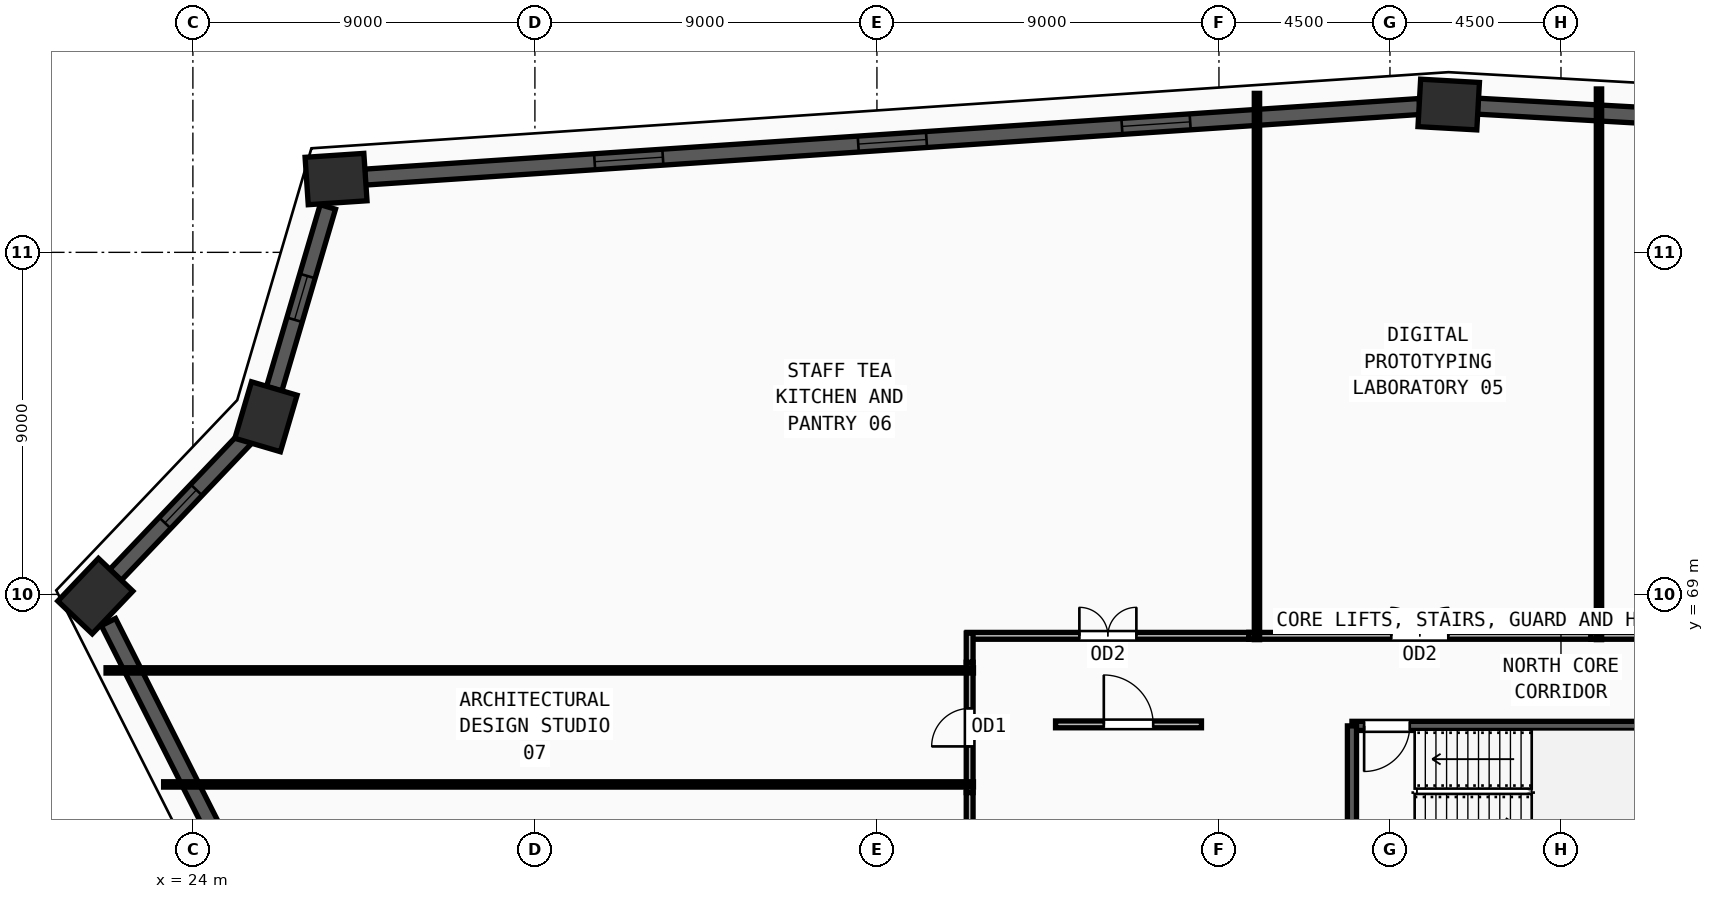
"""IFC4 building model, lengths in metres.
Left out: names, types, materials, properties, quantities, classifications, styles, units other than length and angle.
Written with IfcOpenShell. Run it as: python <this file> out.ifc"""

import sys

from ifc_helpers import new_model, si_unit, direction, frame, frame_2d, origin, origin_2d, place, context, subcontext, project, spatial, rectangle, extrude, source, transform, mapped, element, fill, save


model = new_model("IFC4")
c1 = context("Model", 3, precision=1e-05, world=origin(), true_north=direction((0.0, 1.0)))
c2 = subcontext(c1, "Body", "Model", "MODEL_VIEW")
j1 = project(units=[si_unit("LENGTHUNIT", "METRE"), si_unit("PLANEANGLEUNIT", "RADIAN")], contexts=[c1])
p1 = place(None, origin())
s1 = spatial("IfcSite", under=j1, at=p1, CompositionType="ELEMENT")
p2 = place(p1, origin())
s2 = spatial("IfcBuilding", under=s1, at=p2, CompositionType="ELEMENT")
p3 = place(p2, frame((0.0, 0.0, 51.75)))
s3 = spatial("IfcBuildingStorey", under=s2, at=p3, CompositionType="ELEMENT", Elevation=51.75)
m1 = source(origin(), c2, "Body", "SweptSolid", [
    extrude(rectangle(XDim=1.55, YDim=1.25, at=origin_2d()), origin(), (0.0, 0.0, 1.0), 3.75),
])
for number, where, z_axis, x_axis in (
    (1, (21.433, 68.955, 0.0), (0.0, 0.0, 1.0), (0.689, 0.724, 0.0)),
    (2, (25.923, 73.674, 0.0), (0.0, 0.0, 1.0), (0.283, 0.959, 0.0)),
    (3, (27.767, 79.929, 0.0), (0.0, 0.0, 1.0), (0.998, 0.067, 0.0)),
    (4, (57.046, 81.889, 0.0), (0.0, 0.0, 1.0), (-0.998, 0.056, 0.0)),
):
    element("IfcColumn", number, at=place(p3, frame(where, z_axis=z_axis, x_axis=x_axis)), inside=s3, PredefinedType="COLUMN", context=c2, shape_type="MappedRepresentation", body=[
        mapped(m1, transform((0.0, 0.0, 0.0), x_axis=(1.0, 0.0, 0.0), y_axis=(0.0, 1.0, 0.0), z_axis=(0.0, 0.0, 1.0), scale=1.0)),
    ])
p4 = place(p3, frame((91.471, 79.966, 0.0), z_axis=(0.0, 0.0, 1.0), x_axis=(-0.998444156387, 0.055760797854, 0.0)))
e5 = element("IfcWall", 5, at=p4, inside=s3, PredefinedType="SOLIDWALL", context=c2, shape_type="SweptSolid", body=[
    extrude(rectangle(XDim=33.713, YDim=0.42, at=frame_2d((16.857, 0.0))), origin(), (0.0, 0.0, 1.0), 3.57),
])
m2 = source(origin(), c2, "Body", "SweptSolid", [
    extrude(rectangle(XDim=1.8, YDim=1.95, at=frame_2d((0.9, 0.975))), frame((0.0, 0.22, 0.0), z_axis=(0.0, -1.0, 0.0), x_axis=(1.0, 0.0, 0.0)), (0.0, 0.0, 1.0), 0.44),
])
p5 = place(p4, frame((7.528, 0.0, 0.55)))
e6 = element("IfcOpeningElement", 6, at=p5, cuts=e5, PredefinedType="OPENING", context=c2, shape_type="MappedRepresentation", body=[
    mapped(m2, transform((0.0, 0.0, 0.0), x_axis=(1.0, 0.0, 0.0), y_axis=(0.0, 1.0, 0.0), z_axis=(0.0, 0.0, 1.0), scale=1.0)),
])
p6 = place(p4, frame((15.957, 0.0, 0.55)))
e7 = element("IfcOpeningElement", 7, at=p6, cuts=e5, PredefinedType="OPENING", context=c2, shape_type="MappedRepresentation", body=[
    mapped(m2, transform((0.0, 0.0, 0.0), x_axis=(1.0, 0.0, 0.0), y_axis=(0.0, 1.0, 0.0), z_axis=(0.0, 0.0, 1.0), scale=1.0)),
])
p7 = place(p4, frame((24.385, 0.0, 0.55)))
e8 = element("IfcOpeningElement", 8, at=p7, cuts=e5, PredefinedType="OPENING", context=c2, shape_type="MappedRepresentation", body=[
    mapped(m2, transform((0.0, 0.0, 0.0), x_axis=(1.0, 0.0, 0.0), y_axis=(0.0, 1.0, 0.0), z_axis=(0.0, 0.0, 1.0), scale=1.0)),
])
p8 = place(p3, frame((56.283, 81.838, 0.0), z_axis=(0.0, 0.0, 1.0), x_axis=(-0.99776671065, -0.066795142933, 0.0)))
e9 = element("IfcWall", 9, at=p8, inside=s3, PredefinedType="SOLIDWALL", context=c2, shape_type="SweptSolid", body=[
    extrude(rectangle(XDim=27.815, YDim=0.42, at=frame_2d((13.907, 0.0))), origin(), (0.0, 0.0, 1.0), 3.57),
])
p9 = place(p8, frame((6.054, 0.0, 0.55)))
e10 = element("IfcOpeningElement", 10, at=p9, cuts=e9, PredefinedType="OPENING", context=c2, shape_type="MappedRepresentation", body=[
    mapped(m2, transform((0.0, 0.0, 0.0), x_axis=(1.0, 0.0, 0.0), y_axis=(0.0, 1.0, 0.0), z_axis=(0.0, 0.0, 1.0), scale=1.0)),
])
p10 = place(p8, frame((13.008, 0.0, 0.55)))
e11 = element("IfcOpeningElement", 11, at=p10, cuts=e9, PredefinedType="OPENING", context=c2, shape_type="MappedRepresentation", body=[
    mapped(m2, transform((0.0, 0.0, 0.0), x_axis=(1.0, 0.0, 0.0), y_axis=(0.0, 1.0, 0.0), z_axis=(0.0, 0.0, 1.0), scale=1.0)),
])
p11 = place(p8, frame((19.961, 0.0, 0.55)))
e12 = element("IfcOpeningElement", 12, at=p11, cuts=e9, PredefinedType="OPENING", context=c2, shape_type="MappedRepresentation", body=[
    mapped(m2, transform((0.0, 0.0, 0.0), x_axis=(1.0, 0.0, 0.0), y_axis=(0.0, 1.0, 0.0), z_axis=(0.0, 0.0, 1.0), scale=1.0)),
])
p12 = place(p3, frame((27.551, 79.195, 0.0), z_axis=(0.0, 0.0, 1.0), x_axis=(-0.282928947313, -0.959140871182, 0.0)))
e13 = element("IfcWall", 13, at=p12, inside=s3, PredefinedType="SOLIDWALL", context=c2, shape_type="SweptSolid", body=[
    extrude(rectangle(XDim=4.991, YDim=0.42, at=frame_2d((2.496, 0.0))), origin(), (0.0, 0.0, 1.0), 3.57),
])
m3 = source(origin(), c2, "Body", "SweptSolid", [
    extrude(rectangle(XDim=1.2, YDim=1.9, at=frame_2d((0.6, 0.95))), frame((0.0, 0.22, 0.0), z_axis=(0.0, -1.0, 0.0), x_axis=(1.0, 0.0, 0.0)), (0.0, 0.0, 1.0), 0.44),
])
p13 = place(p12, frame((1.895, 0.0, 0.55)))
e14 = element("IfcOpeningElement", 14, at=p13, cuts=e13, PredefinedType="OPENING", context=c2, shape_type="MappedRepresentation", body=[
    mapped(m3, transform((0.0, 0.0, 0.0), x_axis=(1.0, 0.0, 0.0), y_axis=(0.0, 1.0, 0.0), z_axis=(0.0, 0.0, 1.0), scale=1.0)),
])
p14 = place(p3, frame((25.396, 73.12, 0.0), z_axis=(0.0, 0.0, 1.0), x_axis=(-0.689329780071, -0.724447689145, 0.0)))
e15 = element("IfcWall", 15, at=p14, inside=s3, PredefinedType="SOLIDWALL", context=c2, shape_type="SweptSolid", body=[
    extrude(rectangle(XDim=4.985, YDim=0.42, at=frame_2d((2.492, 0.0))), origin(), (0.0, 0.0, 1.0), 3.57),
])
p15 = place(p14, frame((1.892, 0.0, 0.55)))
e16 = element("IfcOpeningElement", 16, at=p15, cuts=e15, PredefinedType="OPENING", context=c2, shape_type="MappedRepresentation", body=[
    mapped(m3, transform((0.0, 0.0, 0.0), x_axis=(1.0, 0.0, 0.0), y_axis=(0.0, 1.0, 0.0), z_axis=(0.0, 0.0, 1.0), scale=1.0)),
])
p16 = place(p3, frame((21.778, 68.272, 0.0), z_axis=(0.0, 0.0, 1.0), x_axis=(0.45088567069, -0.892581711647, 0.0)))
e17 = element("IfcWall", 17, at=p16, inside=s3, PredefinedType="SOLIDWALL", context=c2, shape_type="SweptSolid", body=[
    extrude(rectangle(XDim=33.713, YDim=0.42, at=frame_2d((16.857, 0.0))), origin(), (0.0, 0.0, 1.0), 3.57),
])
p17 = place(p16, frame((7.528, 0.0, 0.55)))
e18 = element("IfcOpeningElement", 18, at=p17, cuts=e17, PredefinedType="OPENING", context=c2, shape_type="MappedRepresentation", body=[
    mapped(m2, transform((0.0, 0.0, 0.0), x_axis=(1.0, 0.0, 0.0), y_axis=(0.0, 1.0, 0.0), z_axis=(0.0, 0.0, 1.0), scale=1.0)),
])
p18 = place(p16, frame((15.957, 0.0, 0.55)))
e19 = element("IfcOpeningElement", 19, at=p18, cuts=e17, PredefinedType="OPENING", context=c2, shape_type="MappedRepresentation", body=[
    mapped(m2, transform((0.0, 0.0, 0.0), x_axis=(1.0, 0.0, 0.0), y_axis=(0.0, 1.0, 0.0), z_axis=(0.0, 0.0, 1.0), scale=1.0)),
])
p19 = place(p16, frame((23.535, 0.0, 0.55)))
e20 = element("IfcOpeningElement", 20, at=p19, cuts=e17, PredefinedType="OPENING", context=c2, shape_type="MappedRepresentation", body=[
    mapped(m2, transform((0.0, 0.0, 0.0), x_axis=(1.0, 0.0, 0.0), y_axis=(0.0, 1.0, 0.0), z_axis=(0.0, 0.0, 1.0), scale=1.0)),
])
p20 = place(p3, frame((62.32, 65.54, 0.0), z_axis=(0.0, 0.0, 1.0), x_axis=(-1.0, 0.0, 0.0)))
e21 = element("IfcWall", 21, at=p20, inside=s3, PredefinedType="SOLIDWALL", context=c2, shape_type="SweptSolid", body=[
    extrude(rectangle(XDim=7.82, YDim=0.24, at=frame_2d((3.91, 0.0))), origin(), (0.0, 0.0, 1.0), 3.57),
])
m4 = source(origin(), c2, "Body", "SweptSolid", [
    extrude(rectangle(XDim=1.2, YDim=2.2, at=frame_2d((0.6, 1.1))), frame((0.0, 0.13, 0.0), z_axis=(0.0, -1.0, 0.0), x_axis=(1.0, 0.0, 0.0)), (0.0, 0.0, 1.0), 0.26),
])
p21 = place(p20, frame((6.3, 0.0, 0.0)))
e22 = element("IfcOpeningElement", 22, at=p21, cuts=e21, PredefinedType="OPENING", context=c2, shape_type="MappedRepresentation", body=[
    mapped(m4, transform((0.0, 0.0, 0.0), x_axis=(1.0, 0.0, 0.0), y_axis=(0.0, 1.0, 0.0), z_axis=(0.0, 0.0, 1.0), scale=1.0)),
])
p22 = place(p3, frame((54.5, 65.54, 0.0), z_axis=(0.0, 0.0, 1.0), x_axis=(0.0, -1.0, 0.0)))
e23 = element("IfcWall", 23, at=p22, inside=s3, PredefinedType="SOLIDWALL", context=c2, shape_type="SweptSolid", body=[
    extrude(rectangle(XDim=3.44, YDim=0.24, at=frame_2d((1.72, 0.0))), origin(), (0.0, 0.0, 1.0), 3.57),
])
p23 = place(p3, frame((46.7, 65.58, 0.0), z_axis=(0.0, 0.0, 1.0), x_axis=(1.0, 0.0, 0.0)))
e24 = element("IfcWall", 24, at=p23, inside=s3, PredefinedType="PARTITIONING", context=c2, shape_type="SweptSolid", body=[
    extrude(rectangle(XDim=3.84, YDim=0.18, at=frame_2d((1.92, 0.0))), origin(), (0.0, 0.0, 1.0), 3.57),
])
m5 = source(origin(), c2, "Body", "SweptSolid", [
    extrude(rectangle(XDim=1.3, YDim=2.2, at=frame_2d((0.65, 1.1))), frame((0.0, 0.1, 0.0), z_axis=(0.0, -1.0, 0.0), x_axis=(1.0, 0.0, 0.0)), (0.0, 0.0, 1.0), 0.2),
])
p24 = place(p23, frame((1.27, 0.0, 0.0)))
e25 = element("IfcOpeningElement", 25, at=p24, cuts=e24, PredefinedType="OPENING", context=c2, shape_type="MappedRepresentation", body=[
    mapped(m5, transform((0.0, 0.0, 0.0), x_axis=(1.0, 0.0, 0.0), y_axis=(0.0, 1.0, 0.0), z_axis=(0.0, 0.0, 1.0), scale=1.0)),
])
p25 = place(p3, frame((60.785, 67.91, 0.0), z_axis=(0.0, 0.0, 1.0), x_axis=(1.0, 0.0, 0.0)))
e26 = element("IfcWall", 26, at=p25, inside=s3, PredefinedType="PARTITIONING", context=c2, shape_type="SweptSolid", body=[
    extrude(rectangle(XDim=8.0, YDim=0.18, at=frame_2d((4.0, 0.0))), origin(), (0.0, 0.0, 1.0), 3.57),
])
m6 = source(origin(), c2, "Body", "SweptSolid", [
    extrude(rectangle(XDim=1.0, YDim=2.2, at=frame_2d((0.5, 1.1))), frame((0.0, 0.1, 0.0), z_axis=(0.0, -1.0, 0.0), x_axis=(1.0, 0.0, 0.0)), (0.0, 0.0, 1.0), 0.2),
])
p26 = place(p25, frame((3.5, 0.0, 0.0)))
e27 = element("IfcOpeningElement", 27, at=p26, cuts=e26, PredefinedType="OPENING", context=c2, shape_type="MappedRepresentation", body=[
    mapped(m6, transform((0.0, 0.0, 0.0), x_axis=(1.0, 0.0, 0.0), y_axis=(0.0, 1.0, 0.0), z_axis=(0.0, 0.0, 1.0), scale=1.0)),
])
p27 = place(p3, frame((51.785, 67.91, 0.0), z_axis=(0.0, 0.0, 1.0), x_axis=(1.0, 0.0, 0.0)))
e28 = element("IfcWall", 28, at=p27, inside=s3, PredefinedType="PARTITIONING", context=c2, shape_type="SweptSolid", body=[
    extrude(rectangle(XDim=9.0, YDim=0.18, at=frame_2d((4.5, 0.0))), origin(), (0.0, 0.0, 1.0), 3.57),
])
m7 = source(origin(), c2, "Body", "SweptSolid", [
    extrude(rectangle(XDim=1.5, YDim=2.2, at=frame_2d((0.75, 1.1))), frame((0.0, 0.1, 0.0), z_axis=(0.0, -1.0, 0.0), x_axis=(1.0, 0.0, 0.0)), (0.0, 0.0, 1.0), 0.2),
])
p28 = place(p27, frame((3.75, 0.0, 0.0)))
e29 = element("IfcOpeningElement", 29, at=p28, cuts=e28, PredefinedType="OPENING", context=c2, shape_type="MappedRepresentation", body=[
    mapped(m7, transform((0.0, 0.0, 0.0), x_axis=(1.0, 0.0, 0.0), y_axis=(0.0, 1.0, 0.0), z_axis=(0.0, 0.0, 1.0), scale=1.0)),
])
p29 = place(p3, frame((44.37, 67.91, 0.0), z_axis=(0.0, 0.0, 1.0), x_axis=(1.0, 0.0, 0.0)))
e30 = element("IfcWall", 30, at=p29, inside=s3, PredefinedType="PARTITIONING", context=c2, shape_type="SweptSolid", body=[
    extrude(rectangle(XDim=7.415, YDim=0.18, at=frame_2d((3.708, 0.0))), origin(), (0.0, 0.0, 1.0), 3.57),
])
p30 = place(p29, frame((2.957, 0.0, 0.0)))
e31 = element("IfcOpeningElement", 31, at=p30, cuts=e30, PredefinedType="OPENING", context=c2, shape_type="MappedRepresentation", body=[
    mapped(m7, transform((0.0, 0.0, 0.0), x_axis=(1.0, 0.0, 0.0), y_axis=(0.0, 1.0, 0.0), z_axis=(0.0, 0.0, 1.0), scale=1.0)),
])
p31 = place(p3, frame((44.44, 63.785, 0.0), z_axis=(0.0, 0.0, 1.0), x_axis=(0.0, 1.0, 0.0)))
e32 = element("IfcWall", 32, at=p31, inside=s3, PredefinedType="PARTITIONING", context=c2, shape_type="SweptSolid", body=[
    extrude(rectangle(XDim=3.43, YDim=0.18, at=frame_2d((1.715, 0.0))), origin(), (0.0, 0.0, 1.0), 3.57),
])
p32 = place(p31, frame((1.215, 0.0, 0.0)))
e33 = element("IfcOpeningElement", 33, at=p32, cuts=e32, PredefinedType="OPENING", context=c2, shape_type="MappedRepresentation", body=[
    mapped(m6, transform((0.0, 0.0, 0.0), x_axis=(1.0, 0.0, 0.0), y_axis=(0.0, 1.0, 0.0), z_axis=(0.0, 0.0, 1.0), scale=1.0)),
])
p33 = place(p3, frame((44.44, 57.785, 0.0), z_axis=(0.0, 0.0, 1.0), x_axis=(0.0, 1.0, 0.0)))
e34 = element("IfcWall", 34, at=p33, inside=s3, PredefinedType="PARTITIONING", context=c2, shape_type="SweptSolid", body=[
    extrude(rectangle(XDim=6.0, YDim=0.18, at=frame_2d((3.0, 0.0))), origin(), (0.0, 0.0, 1.0), 3.57),
])
p34 = place(p33, frame((2.5, 0.0, 0.0)))
e35 = element("IfcOpeningElement", 35, at=p34, cuts=e34, PredefinedType="OPENING", context=c2, shape_type="MappedRepresentation", body=[
    mapped(m6, transform((0.0, 0.0, 0.0), x_axis=(1.0, 0.0, 0.0), y_axis=(0.0, 1.0, 0.0), z_axis=(0.0, 0.0, 1.0), scale=1.0)),
])
p35 = place(p3, frame((44.44, 67.215, 0.0), z_axis=(0.0, 0.0, 1.0), x_axis=(0.0, 1.0, 0.0)))
e36 = element("IfcWall", 36, at=p35, inside=s3, PredefinedType="PARTITIONING", context=c2, shape_type="SweptSolid", body=[
    extrude(rectangle(XDim=0.765, YDim=0.18, at=frame_2d((0.382, 0.0))), origin(), (0.0, 0.0, 1.0), 3.57),
])
p36 = place(p3, frame((44.54, 64.0, 0.0), z_axis=(0.0, 0.0, 1.0), x_axis=(-1.0, 0.0, 0.0)))
e37 = element("IfcWall", 37, at=p36, inside=s3, PredefinedType="PARTITIONING", context=c2, shape_type="SweptSolid", body=[
    extrude(rectangle(XDim=21.31, YDim=0.14, at=frame_2d((10.655, 0.0))), origin(), (0.0, 0.0, 1.0), 2.655),
])
p37 = place(p3, frame((44.54, 67.0, 0.0), z_axis=(0.0, 0.0, 1.0), x_axis=(-1.0, 0.0, 0.0)))
e38 = element("IfcWall", 38, at=p37, inside=s3, PredefinedType="PARTITIONING", context=c2, shape_type="SweptSolid", body=[
    extrude(rectangle(XDim=22.825, YDim=0.14, at=frame_2d((11.413, 0.0))), origin(), (0.0, 0.0, 1.0), 2.655),
])
p38 = place(p3, frame((52.0, 67.81, 0.0), z_axis=(0.0, 0.0, 1.0), x_axis=(0.0, 1.0, 0.0)))
e39 = element("IfcWall", 39, at=p38, inside=s3, PredefinedType="PARTITIONING", context=c2, shape_type="SweptSolid", body=[
    extrude(rectangle(XDim=14.373, YDim=0.14, at=frame_2d((7.187, 0.0))), origin(), (0.0, 0.0, 1.0), 3.57),
])
p39 = place(p3, frame((61.0, 67.81, 0.0), z_axis=(0.0, 0.0, 1.0), x_axis=(0.0, 1.0, 0.0)))
e40 = element("IfcWall", 40, at=p39, inside=s3, PredefinedType="PARTITIONING", context=c2, shape_type="SweptSolid", body=[
    extrude(rectangle(XDim=14.489, YDim=0.14, at=frame_2d((7.245, 0.0))), origin(), (0.0, 0.0, 1.0), 3.57),
])
m8 = source(origin(), c2, "Body", "SweptSolid", [
    extrude(rectangle(XDim=1.8, YDim=1.95, at=frame_2d((0.9, 0.975))), frame((0.0, 0.03, 0.0), z_axis=(0.0, -1.0, 0.0), x_axis=(1.0, 0.0, 0.0)), (0.0, 0.0, 1.0), 0.06),
])
p40 = place(p9, origin())
e41 = element("IfcWindow", 41, at=p40, inside=s3, PartitioningType="DOUBLE_PANEL_VERTICAL", PredefinedType="WINDOW", context=c2, shape_type="MappedRepresentation", body=[
    mapped(m8, transform((0.0, 0.0, 0.0), x_axis=(1.0, 0.0, 0.0), y_axis=(0.0, 1.0, 0.0), z_axis=(0.0, 0.0, 1.0), scale=1.0)),
])
fill(e10, e41)
p41 = place(p10, origin())
e42 = element("IfcWindow", 42, at=p41, inside=s3, PartitioningType="DOUBLE_PANEL_VERTICAL", PredefinedType="WINDOW", context=c2, shape_type="MappedRepresentation", body=[
    mapped(m8, transform((0.0, 0.0, 0.0), x_axis=(1.0, 0.0, 0.0), y_axis=(0.0, 1.0, 0.0), z_axis=(0.0, 0.0, 1.0), scale=1.0)),
])
fill(e11, e42)
p42 = place(p11, origin())
e43 = element("IfcWindow", 43, at=p42, inside=s3, PartitioningType="DOUBLE_PANEL_VERTICAL", PredefinedType="WINDOW", context=c2, shape_type="MappedRepresentation", body=[
    mapped(m8, transform((0.0, 0.0, 0.0), x_axis=(1.0, 0.0, 0.0), y_axis=(0.0, 1.0, 0.0), z_axis=(0.0, 0.0, 1.0), scale=1.0)),
])
fill(e12, e43)
m9 = source(origin(), c2, "Body", "SweptSolid", [
    extrude(rectangle(XDim=1.2, YDim=1.9, at=frame_2d((0.6, 0.95))), frame((0.0, 0.03, 0.0), z_axis=(0.0, -1.0, 0.0), x_axis=(1.0, 0.0, 0.0)), (0.0, 0.0, 1.0), 0.06),
])
p43 = place(p13, origin())
e44 = element("IfcWindow", 44, at=p43, inside=s3, PartitioningType="SINGLE_PANEL", PredefinedType="WINDOW", context=c2, shape_type="MappedRepresentation", body=[
    mapped(m9, transform((0.0, 0.0, 0.0), x_axis=(1.0, 0.0, 0.0), y_axis=(0.0, 1.0, 0.0), z_axis=(0.0, 0.0, 1.0), scale=1.0)),
])
fill(e14, e44)
p44 = place(p15, origin())
e45 = element("IfcWindow", 45, at=p44, inside=s3, PartitioningType="SINGLE_PANEL", PredefinedType="WINDOW", context=c2, shape_type="MappedRepresentation", body=[
    mapped(m9, transform((0.0, 0.0, 0.0), x_axis=(1.0, 0.0, 0.0), y_axis=(0.0, 1.0, 0.0), z_axis=(0.0, 0.0, 1.0), scale=1.0)),
])
fill(e16, e45)
m10 = source(origin(), c2, "Body", "SweptSolid", [
    extrude(rectangle(XDim=1.2, YDim=2.2, at=frame_2d((0.6, 1.1))), frame((0.0, 0.025, 0.0), z_axis=(0.0, -1.0, 0.0), x_axis=(1.0, 0.0, 0.0)), (0.0, 0.0, 1.0), 0.05),
])
p45 = place(p21, origin())
e46 = element("IfcDoor", 46, at=p45, inside=s3, OperationType="SINGLE_SWING_RIGHT", PredefinedType="DOOR", context=c2, shape_type="MappedRepresentation", body=[
    mapped(m10, transform((0.0, 0.0, 0.0), x_axis=(1.0, 0.0, 0.0), y_axis=(0.0, 1.0, 0.0), z_axis=(0.0, 0.0, 1.0), scale=1.0)),
])
fill(e22, e46)
m11 = source(origin(), c2, "Body", "SweptSolid", [
    extrude(rectangle(XDim=1.3, YDim=2.2, at=frame_2d((0.65, 1.1))), frame((0.0, 0.025, 0.0), z_axis=(0.0, -1.0, 0.0), x_axis=(1.0, 0.0, 0.0)), (0.0, 0.0, 1.0), 0.05),
])
p46 = place(p24, origin())
e47 = element("IfcDoor", 47, at=p46, inside=s3, OperationType="SINGLE_SWING_LEFT", PredefinedType="DOOR", context=c2, shape_type="MappedRepresentation", body=[
    mapped(m11, transform((0.0, 0.0, 0.0), x_axis=(1.0, 0.0, 0.0), y_axis=(0.0, 1.0, 0.0), z_axis=(0.0, 0.0, 1.0), scale=1.0)),
])
fill(e25, e47)
m12 = source(origin(), c2, "Body", "SweptSolid", [
    extrude(rectangle(XDim=1.5, YDim=2.2, at=frame_2d((0.75, 1.1))), frame((0.0, 0.025, 0.0), z_axis=(0.0, -1.0, 0.0), x_axis=(1.0, 0.0, 0.0)), (0.0, 0.0, 1.0), 0.05),
])
p47 = place(p28, origin())
e48 = element("IfcDoor", 48, at=p47, inside=s3, OperationType="DOUBLE_DOOR_SINGLE_SWING", PredefinedType="DOOR", context=c2, shape_type="MappedRepresentation", body=[
    mapped(m12, transform((0.0, 0.0, 0.0), x_axis=(1.0, 0.0, 0.0), y_axis=(0.0, 1.0, 0.0), z_axis=(0.0, 0.0, 1.0), scale=1.0)),
])
fill(e29, e48)
p48 = place(p30, origin())
e49 = element("IfcDoor", 49, at=p48, inside=s3, OperationType="DOUBLE_DOOR_SINGLE_SWING", PredefinedType="DOOR", context=c2, shape_type="MappedRepresentation", body=[
    mapped(m12, transform((0.0, 0.0, 0.0), x_axis=(1.0, 0.0, 0.0), y_axis=(0.0, 1.0, 0.0), z_axis=(0.0, 0.0, 1.0), scale=1.0)),
])
fill(e31, e49)
m13 = source(origin(), c2, "Body", "SweptSolid", [
    extrude(rectangle(XDim=1.0, YDim=2.2, at=frame_2d((0.5, 1.1))), frame((0.0, 0.025, 0.0), z_axis=(0.0, -1.0, 0.0), x_axis=(1.0, 0.0, 0.0)), (0.0, 0.0, 1.0), 0.05),
])
p49 = place(p32, origin())
e50 = element("IfcDoor", 50, at=p49, inside=s3, OperationType="SINGLE_SWING_LEFT", PredefinedType="DOOR", context=c2, shape_type="MappedRepresentation", body=[
    mapped(m13, transform((0.0, 0.0, 0.0), x_axis=(1.0, 0.0, 0.0), y_axis=(0.0, 1.0, 0.0), z_axis=(0.0, 0.0, 1.0), scale=1.0)),
])
fill(e33, e50)
save(model, sys.argv[1])
